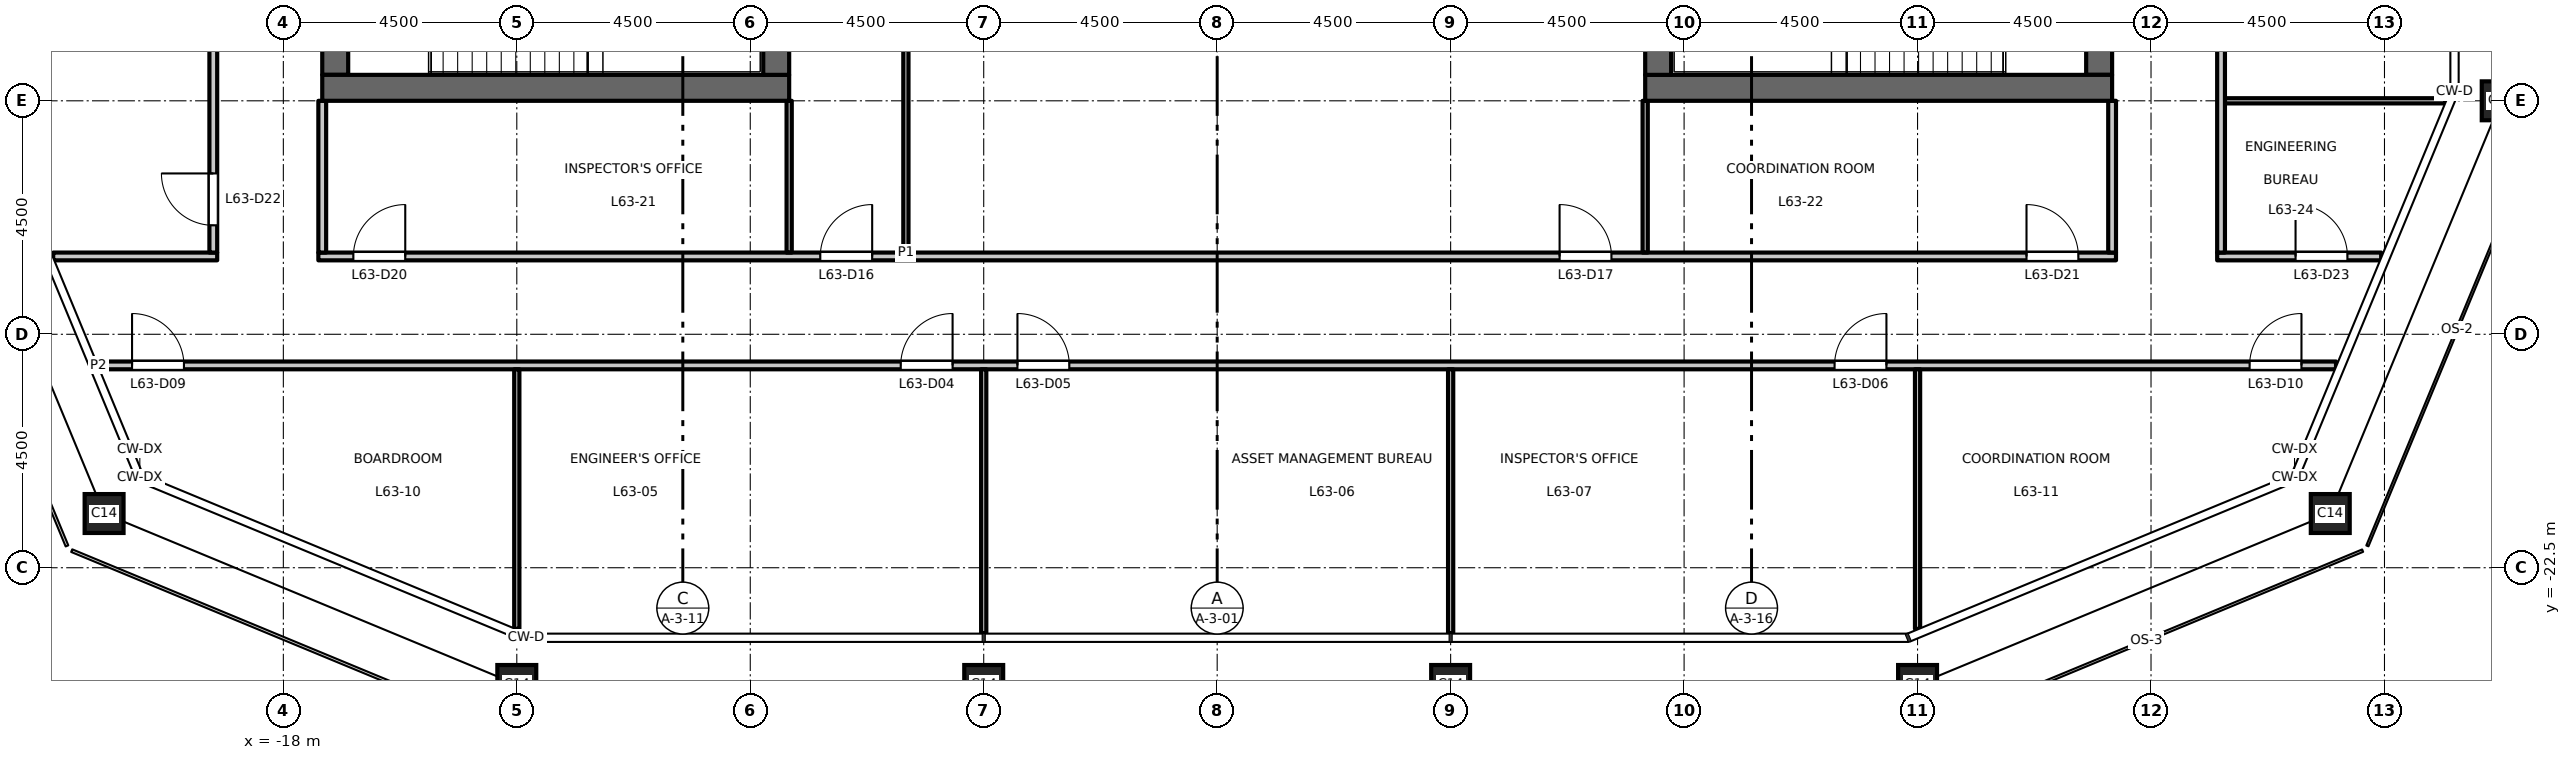
"""IFC4 building model, lengths in metres.
Left out: names, types, materials, properties, quantities, classifications, styles, units other than length and angle.
Written with IfcOpenShell. Run it as: python <this file> out.ifc"""

import sys

from ifc_helpers import new_model, si_unit, direction, frame, frame_2d, origin, origin_2d, place, context, subcontext, project, spatial, rectangle, hollow_rectangle, extrude, element, fill, save


model = new_model("IFC4")
c1 = context("Model", 3, precision=1e-05, world=origin(), true_north=direction((0.0, 1.0)))
c2 = subcontext(c1, "Body", "Model", "MODEL_VIEW")
j1 = project(units=[si_unit("LENGTHUNIT", "METRE"), si_unit("PLANEANGLEUNIT", "RADIAN")], contexts=[c1])
p1 = place(None, origin())
s1 = spatial("IfcSite", under=j1, at=p1, CompositionType="ELEMENT")
p2 = place(p1, origin())
s2 = spatial("IfcBuilding", under=s1, at=p2, CompositionType="ELEMENT")
p3 = place(p2, frame((0.0, 0.0, 294.2)))
s3 = spatial("IfcBuildingStorey", under=s2, at=p3, CompositionType="ELEMENT", Elevation=294.2)
for number, where, z_axis, x_axis in (
    (1, (-13.5, -24.75, 0.0), (0.0, 0.0, 1.0), (1.0, 0.0, 0.0)),
    (2, (-4.5, -24.75, 0.0), (0.0, 0.0, 1.0), (1.0, 0.0, 0.0)),
    (3, (4.5, -24.75, 0.0), (0.0, 0.0, 1.0), (1.0, 0.0, 0.0)),
    (4, (13.5, -24.75, 0.0), (0.0, 0.0, 1.0), (1.0, 0.0, 0.0)),
    (5, (21.455, -21.455, 0.0), (0.0, 0.0, 1.0), (1.0, 0.0, 0.0)),
    (6, (24.75, -13.5, 0.0), (0.0, 0.0, 1.0), (1.0, 0.0, 0.0)),
    (7, (-21.455, -21.455, 0.0), (0.0, 0.0, 1.0), (1.0, 0.0, 0.0)),
):
    element("IfcColumn", number, at=place(p3, frame(where, z_axis=z_axis, x_axis=x_axis)), inside=s3, PredefinedType="COLUMN", context=c2, shape_type="SweptSolid", body=[
        extrude(hollow_rectangle(XDim=0.75, YDim=0.75, WallThickness=0.04, at=origin_2d()), origin(), (0.0, 0.0, 1.0), 4.5),
    ])
p4 = place(p3, frame((-17.0, -13.0, 0.0), z_axis=(0.0, 0.0, 1.0), x_axis=(0.0, 1.0, 0.0)))
e8 = element("IfcWall", 8, at=p4, inside=s3, PredefinedType="SHEAR", context=c2, shape_type="SweptSolid", body=[
    extrude(rectangle(XDim=26.0, YDim=0.5, at=frame_2d((13.0, 0.0))), origin(), (0.0, 0.0, 1.0), 4.35),
])
p5 = place(p4, frame((16.825, 0.0, 0.0)))
e9 = element("IfcOpeningElement", 9, at=p5, cuts=e8, PredefinedType="OPENING", context=c2, shape_type="SweptSolid", body=[
    extrude(rectangle(XDim=1.8, YDim=2.1, at=frame_2d((0.9, 1.05))), frame((0.0, 0.26, 0.0), z_axis=(0.0, -1.0, 0.0), x_axis=(1.0, 0.0, 0.0)), (0.0, 0.0, 1.0), 0.52),
])
p6 = place(p4, frame((7.375, 0.0, 0.0)))
e10 = element("IfcOpeningElement", 10, at=p6, cuts=e8, PredefinedType="OPENING", context=c2, shape_type="SweptSolid", body=[
    extrude(rectangle(XDim=1.8, YDim=2.1, at=frame_2d((0.9, 1.05))), frame((0.0, 0.26, 0.0), z_axis=(0.0, -1.0, 0.0), x_axis=(1.0, 0.0, 0.0)), (0.0, 0.0, 1.0), 0.52),
])
p7 = place(p3, frame((-8.25, -13.25, 0.0), z_axis=(0.0, 0.0, 1.0), x_axis=(-1.0, 0.0, 0.0)))
e11 = element("IfcWall", 11, at=p7, inside=s3, PredefinedType="SHEAR", context=c2, shape_type="SweptSolid", body=[
    extrude(rectangle(XDim=9.0, YDim=0.5, at=frame_2d((4.5, 0.0))), origin(), (0.0, 0.0, 1.0), 4.35),
])
p8 = place(p3, frame((-8.5, -13.0, 0.0), z_axis=(0.0, 0.0, 1.0), x_axis=(0.0, 1.0, 0.0)))
e12 = element("IfcWall", 12, at=p8, inside=s3, PredefinedType="SHEAR", context=c2, shape_type="SweptSolid", body=[
    extrude(rectangle(XDim=26.0, YDim=0.5, at=frame_2d((13.0, 0.0))), origin(), (0.0, 0.0, 1.0), 4.35),
])
p9 = place(p3, frame((17.0, -13.0, 0.0), z_axis=(0.0, 0.0, 1.0), x_axis=(0.0, 1.0, 0.0)))
e13 = element("IfcWall", 13, at=p9, inside=s3, PredefinedType="SHEAR", context=c2, shape_type="SweptSolid", body=[
    extrude(rectangle(XDim=26.0, YDim=0.5, at=frame_2d((13.0, 0.0))), origin(), (0.0, 0.0, 1.0), 4.35),
])
p10 = place(p9, frame((16.825, 0.0, 0.0)))
e14 = element("IfcOpeningElement", 14, at=p10, cuts=e13, PredefinedType="OPENING", context=c2, shape_type="SweptSolid", body=[
    extrude(rectangle(XDim=1.8, YDim=2.1, at=frame_2d((0.9, 1.05))), frame((0.0, 0.26, 0.0), z_axis=(0.0, -1.0, 0.0), x_axis=(1.0, 0.0, 0.0)), (0.0, 0.0, 1.0), 0.52),
])
p11 = place(p9, frame((7.375, 0.0, 0.0)))
e15 = element("IfcOpeningElement", 15, at=p11, cuts=e13, PredefinedType="OPENING", context=c2, shape_type="SweptSolid", body=[
    extrude(rectangle(XDim=1.8, YDim=2.1, at=frame_2d((0.9, 1.05))), frame((0.0, 0.26, 0.0), z_axis=(0.0, -1.0, 0.0), x_axis=(1.0, 0.0, 0.0)), (0.0, 0.0, 1.0), 0.52),
])
p12 = place(p3, frame((8.25, -13.25, 0.0), z_axis=(0.0, 0.0, 1.0), x_axis=(1.0, 0.0, 0.0)))
e16 = element("IfcWall", 16, at=p12, inside=s3, PredefinedType="SHEAR", context=c2, shape_type="SweptSolid", body=[
    extrude(rectangle(XDim=9.0, YDim=0.5, at=frame_2d((4.5, 0.0))), origin(), (0.0, 0.0, 1.0), 4.35),
])
p13 = place(p3, frame((8.5, -13.0, 0.0), z_axis=(0.0, 0.0, 1.0), x_axis=(0.0, 1.0, 0.0)))
e17 = element("IfcWall", 17, at=p13, inside=s3, PredefinedType="SHEAR", context=c2, shape_type="SweptSolid", body=[
    extrude(rectangle(XDim=26.0, YDim=0.5, at=frame_2d((13.0, 0.0))), origin(), (0.0, 0.0, 1.0), 4.35),
])
p14 = place(p3, frame((-21.566, -18.6, 0.0), z_axis=(0.0, 0.0, 1.0), x_axis=(1.0, 0.0, 0.0)))
e18 = element("IfcWall", 18, at=p14, inside=s3, PredefinedType="PARTITIONING", context=c2, shape_type="SweptSolid", body=[
    extrude(rectangle(XDim=43.132, YDim=0.15, at=frame_2d((21.566, 0.0))), origin(), (0.0, 0.0, 1.0), 4.35),
])
p15 = place(p14, frame((15.466, 0.0, 0.0)))
e19 = element("IfcOpeningElement", 19, at=p15, cuts=e18, PredefinedType="OPENING", context=c2, shape_type="SweptSolid", body=[
    extrude(rectangle(XDim=1.0, YDim=2.1, at=frame_2d((0.5, 1.05))), frame((0.0, 0.085, 0.0), z_axis=(0.0, -1.0, 0.0), x_axis=(1.0, 0.0, 0.0)), (0.0, 0.0, 1.0), 0.17),
])
p16 = place(p14, frame((17.716, 0.0, 0.0)))
e20 = element("IfcOpeningElement", 20, at=p16, cuts=e18, PredefinedType="OPENING", context=c2, shape_type="SweptSolid", body=[
    extrude(rectangle(XDim=1.0, YDim=2.1, at=frame_2d((0.5, 1.05))), frame((0.0, 0.085, 0.0), z_axis=(0.0, -1.0, 0.0), x_axis=(1.0, 0.0, 0.0)), (0.0, 0.0, 1.0), 0.17),
])
p17 = place(p14, frame((33.466, 0.0, 0.0)))
e21 = element("IfcOpeningElement", 21, at=p17, cuts=e18, PredefinedType="OPENING", context=c2, shape_type="SweptSolid", body=[
    extrude(rectangle(XDim=1.0, YDim=2.1, at=frame_2d((0.5, 1.05))), frame((0.0, 0.085, 0.0), z_axis=(0.0, -1.0, 0.0), x_axis=(1.0, 0.0, 0.0)), (0.0, 0.0, 1.0), 0.17),
])
p18 = place(p14, frame((0.65, 0.0, 0.0)))
e22 = element("IfcOpeningElement", 22, at=p18, cuts=e18, PredefinedType="OPENING", context=c2, shape_type="SweptSolid", body=[
    extrude(rectangle(XDim=1.0, YDim=2.1, at=frame_2d((0.5, 1.05))), frame((0.0, 0.085, 0.0), z_axis=(0.0, -1.0, 0.0), x_axis=(1.0, 0.0, 0.0)), (0.0, 0.0, 1.0), 0.17),
])
p19 = place(p14, frame((41.466, 0.0, 0.0)))
e23 = element("IfcOpeningElement", 23, at=p19, cuts=e18, PredefinedType="OPENING", context=c2, shape_type="SweptSolid", body=[
    extrude(rectangle(XDim=1.0, YDim=2.1, at=frame_2d((0.5, 1.05))), frame((0.0, 0.085, 0.0), z_axis=(0.0, -1.0, 0.0), x_axis=(1.0, 0.0, 0.0)), (0.0, 0.0, 1.0), 0.17),
])
p20 = place(p3, frame((-22.436, -16.5, 0.0), z_axis=(0.0, 0.0, 1.0), x_axis=(1.0, 0.0, 0.0)))
e24 = element("IfcWall", 24, at=p20, inside=s3, PredefinedType="PARTITIONING", context=c2, shape_type="SweptSolid", body=[
    extrude(rectangle(XDim=3.161, YDim=0.15, at=frame_2d((1.581, 0.0))), origin(), (0.0, 0.0, 1.0), 4.35),
])
p21 = place(p3, frame((-17.325, -16.5, 0.0), z_axis=(0.0, 0.0, 1.0), x_axis=(1.0, 0.0, 0.0)))
e25 = element("IfcWall", 25, at=p21, inside=s3, PredefinedType="PARTITIONING", context=c2, shape_type="SweptSolid", body=[
    extrude(rectangle(XDim=34.65, YDim=0.15, at=frame_2d((17.325, 0.0))), origin(), (0.0, 0.0, 1.0), 4.35),
])
p22 = place(p21, frame((9.675, 0.0, 0.0)))
e26 = element("IfcOpeningElement", 26, at=p22, cuts=e25, PredefinedType="OPENING", context=c2, shape_type="SweptSolid", body=[
    extrude(rectangle(XDim=1.0, YDim=2.1, at=frame_2d((0.5, 1.05))), frame((0.0, 0.085, 0.0), z_axis=(0.0, -1.0, 0.0), x_axis=(1.0, 0.0, 0.0)), (0.0, 0.0, 1.0), 0.17),
])
p23 = place(p21, frame((23.925, 0.0, 0.0)))
e27 = element("IfcOpeningElement", 27, at=p23, cuts=e25, PredefinedType="OPENING", context=c2, shape_type="SweptSolid", body=[
    extrude(rectangle(XDim=1.0, YDim=2.1, at=frame_2d((0.5, 1.05))), frame((0.0, 0.085, 0.0), z_axis=(0.0, -1.0, 0.0), x_axis=(1.0, 0.0, 0.0)), (0.0, 0.0, 1.0), 0.17),
])
p24 = place(p21, frame((0.675, 0.0, 0.0)))
e28 = element("IfcOpeningElement", 28, at=p24, cuts=e25, PredefinedType="OPENING", context=c2, shape_type="SweptSolid", body=[
    extrude(rectangle(XDim=1.0, YDim=2.1, at=frame_2d((0.5, 1.05))), frame((0.0, 0.085, 0.0), z_axis=(0.0, -1.0, 0.0), x_axis=(1.0, 0.0, 0.0)), (0.0, 0.0, 1.0), 0.17),
])
p25 = place(p21, frame((32.925, 0.0, 0.0)))
e29 = element("IfcOpeningElement", 29, at=p25, cuts=e25, PredefinedType="OPENING", context=c2, shape_type="SweptSolid", body=[
    extrude(rectangle(XDim=1.0, YDim=2.1, at=frame_2d((0.5, 1.05))), frame((0.0, 0.085, 0.0), z_axis=(0.0, -1.0, 0.0), x_axis=(1.0, 0.0, 0.0)), (0.0, 0.0, 1.0), 0.17),
])
p26 = place(p3, frame((19.275, -16.5, 0.0), z_axis=(0.0, 0.0, 1.0), x_axis=(1.0, 0.0, 0.0)))
e30 = element("IfcWall", 30, at=p26, inside=s3, PredefinedType="PARTITIONING", context=c2, shape_type="SweptSolid", body=[
    extrude(rectangle(XDim=3.161, YDim=0.15, at=frame_2d((1.581, 0.0))), origin(), (0.0, 0.0, 1.0), 4.35),
])
p27 = place(p26, frame((1.511, 0.0, 0.0)))
e31 = element("IfcOpeningElement", 31, at=p27, cuts=e30, PredefinedType="OPENING", context=c2, shape_type="SweptSolid", body=[
    extrude(rectangle(XDim=1.0, YDim=2.1, at=frame_2d((0.5, 1.05))), frame((0.0, 0.085, 0.0), z_axis=(0.0, -1.0, 0.0), x_axis=(1.0, 0.0, 0.0)), (0.0, 0.0, 1.0), 0.17),
])
p28 = place(p3, frame((19.425, -13.5, 0.0), z_axis=(0.0, 0.0, 1.0), x_axis=(1.0, 0.0, 0.0)))
e32 = element("IfcWall", 32, at=p28, inside=s3, PredefinedType="PARTITIONING", context=c2, shape_type="SweptSolid", body=[
    extrude(rectangle(XDim=4.253, YDim=0.1, at=frame_2d((2.126, 0.0))), origin(), (0.0, 0.0, 1.0), 4.35),
])
p29 = place(p3, frame((-19.35, -16.425, 0.0), z_axis=(0.0, 0.0, 1.0), x_axis=(0.0, 1.0, 0.0)))
e33 = element("IfcWall", 33, at=p29, inside=s3, PredefinedType="PARTITIONING", context=c2, shape_type="SweptSolid", body=[
    extrude(rectangle(XDim=32.85, YDim=0.15, at=frame_2d((16.425, 0.0))), origin(), (0.0, 0.0, 1.0), 4.35),
])
p30 = place(p29, frame((0.525, 0.0, 0.0)))
e34 = element("IfcOpeningElement", 34, at=p30, cuts=e33, PredefinedType="OPENING", context=c2, shape_type="SweptSolid", body=[
    extrude(rectangle(XDim=1.0, YDim=2.1, at=frame_2d((0.5, 1.05))), frame((0.0, 0.085, 0.0), z_axis=(0.0, -1.0, 0.0), x_axis=(1.0, 0.0, 0.0)), (0.0, 0.0, 1.0), 0.17),
])
p31 = place(p3, frame((-17.25, -16.425, 0.0), z_axis=(0.0, 0.0, 1.0), x_axis=(0.0, 1.0, 0.0)))
e35 = element("IfcWall", 35, at=p31, inside=s3, PredefinedType="PARTITIONING", context=c2, shape_type="SweptSolid", body=[
    extrude(rectangle(XDim=2.925, YDim=0.15, at=frame_2d((1.462, 0.0))), origin(), (0.0, 0.0, 1.0), 4.35),
])
p32 = place(p3, frame((-13.5, -23.678, 0.0), z_axis=(0.0, 0.0, 1.0), x_axis=(0.0, 1.0, 0.0)))
e36 = element("IfcWall", 36, at=p32, inside=s3, PredefinedType="PARTITIONING", context=c2, shape_type="SweptSolid", body=[
    extrude(rectangle(XDim=5.003, YDim=0.1, at=frame_2d((2.501, 0.0))), origin(), (0.0, 0.0, 1.0), 3.75),
])
p33 = place(p3, frame((-8.25, -16.425, 0.0), z_axis=(0.0, 0.0, 1.0), x_axis=(0.0, 1.0, 0.0)))
e37 = element("IfcWall", 37, at=p33, inside=s3, PredefinedType="PARTITIONING", context=c2, shape_type="SweptSolid", body=[
    extrude(rectangle(XDim=2.925, YDim=0.1, at=frame_2d((1.462, 0.0))), origin(), (0.0, 0.0, 1.0), 4.35),
])
p34 = place(p3, frame((-6.0, -16.425, 0.0), z_axis=(0.0, 0.0, 1.0), x_axis=(0.0, 1.0, 0.0)))
e38 = element("IfcWall", 38, at=p34, inside=s3, PredefinedType="PARTITIONING", context=c2, shape_type="SweptSolid", body=[
    extrude(rectangle(XDim=7.875, YDim=0.1, at=frame_2d((3.938, 0.0))), origin(), (0.0, 0.0, 1.0), 4.35),
])
for number, where, z_axis, x_axis in (
    (39, (-4.5, -23.76, 0.0), (0.0, 0.0, 1.0), (0.0, 1.0, 0.0)),
    (40, (4.5, -23.76, 0.0), (0.0, 0.0, 1.0), (0.0, 1.0, 0.0)),
):
    element("IfcWall", number, at=place(p3, frame(where, z_axis=z_axis, x_axis=x_axis)), inside=s3, PredefinedType="PARTITIONING", context=c2, shape_type="SweptSolid", body=[
        extrude(rectangle(XDim=5.085, YDim=0.1, at=frame_2d((2.542, 0.0))), origin(), (0.0, 0.0, 1.0), 3.65),
    ])
p35 = place(p3, frame((8.25, -16.425, 0.0), z_axis=(0.0, 0.0, 1.0), x_axis=(0.0, 1.0, 0.0)))
e41 = element("IfcWall", 41, at=p35, inside=s3, PredefinedType="PARTITIONING", context=c2, shape_type="SweptSolid", body=[
    extrude(rectangle(XDim=2.925, YDim=0.1, at=frame_2d((1.462, 0.0))), origin(), (0.0, 0.0, 1.0), 4.35),
])
p36 = place(p3, frame((13.5, -23.678, 0.0), z_axis=(0.0, 0.0, 1.0), x_axis=(0.0, 1.0, 0.0)))
e42 = element("IfcWall", 42, at=p36, inside=s3, PredefinedType="PARTITIONING", context=c2, shape_type="SweptSolid", body=[
    extrude(rectangle(XDim=5.003, YDim=0.1, at=frame_2d((2.501, 0.0))), origin(), (0.0, 0.0, 1.0), 3.75),
])
p37 = place(p3, frame((17.25, -16.425, 0.0), z_axis=(0.0, 0.0, 1.0), x_axis=(0.0, 1.0, 0.0)))
e43 = element("IfcWall", 43, at=p37, inside=s3, PredefinedType="PARTITIONING", context=c2, shape_type="SweptSolid", body=[
    extrude(rectangle(XDim=2.925, YDim=0.15, at=frame_2d((1.462, 0.0))), origin(), (0.0, 0.0, 1.0), 4.35),
])
p38 = place(p3, frame((19.35, -16.425, 0.0), z_axis=(0.0, 0.0, 1.0), x_axis=(0.0, 1.0, 0.0)))
e44 = element("IfcWall", 44, at=p38, inside=s3, PredefinedType="PARTITIONING", context=c2, shape_type="SweptSolid", body=[
    extrude(rectangle(XDim=32.85, YDim=0.15, at=frame_2d((16.425, 0.0))), origin(), (0.0, 0.0, 1.0), 4.35),
])
p39 = place(p38, frame((10.325, 0.0, 0.0)))
e45 = element("IfcOpeningElement", 45, at=p39, cuts=e44, PredefinedType="OPENING", context=c2, shape_type="SweptSolid", body=[
    extrude(rectangle(XDim=1.0, YDim=2.1, at=frame_2d((0.5, 1.05))), frame((0.0, 0.085, 0.0), z_axis=(0.0, -1.0, 0.0), x_axis=(1.0, 0.0, 0.0)), (0.0, 0.0, 1.0), 0.17),
])
p40 = place(p38, frame((12.575, 0.0, 0.0)))
e46 = element("IfcOpeningElement", 46, at=p40, cuts=e44, PredefinedType="OPENING", context=c2, shape_type="SweptSolid", body=[
    extrude(rectangle(XDim=1.0, YDim=2.1, at=frame_2d((0.5, 1.05))), frame((0.0, 0.085, 0.0), z_axis=(0.0, -1.0, 0.0), x_axis=(1.0, 0.0, 0.0)), (0.0, 0.0, 1.0), 0.17),
])
p41 = place(p38, frame((28.325, 0.0, 0.0)))
e47 = element("IfcOpeningElement", 47, at=p41, cuts=e44, PredefinedType="OPENING", context=c2, shape_type="SweptSolid", body=[
    extrude(rectangle(XDim=1.0, YDim=2.1, at=frame_2d((0.5, 1.05))), frame((0.0, 0.085, 0.0), z_axis=(0.0, -1.0, 0.0), x_axis=(1.0, 0.0, 0.0)), (0.0, 0.0, 1.0), 0.17),
])
p42 = place(p15, origin())
e48 = element("IfcDoor", 48, at=p42, inside=s3, OperationType="SINGLE_SWING_RIGHT", PredefinedType="DOOR", context=c2, shape_type="SweptSolid", body=[
    extrude(rectangle(XDim=1.0, YDim=2.1, at=frame_2d((0.5, 1.05))), frame((0.0, 0.025, 0.0), z_axis=(0.0, -1.0, 0.0), x_axis=(1.0, 0.0, 0.0)), (0.0, 0.0, 1.0), 0.05),
])
fill(e19, e48)
p43 = place(p16, origin())
e49 = element("IfcDoor", 49, at=p43, inside=s3, OperationType="SINGLE_SWING_LEFT", PredefinedType="DOOR", context=c2, shape_type="SweptSolid", body=[
    extrude(rectangle(XDim=1.0, YDim=2.1, at=frame_2d((0.5, 1.05))), frame((0.0, 0.025, 0.0), z_axis=(0.0, -1.0, 0.0), x_axis=(1.0, 0.0, 0.0)), (0.0, 0.0, 1.0), 0.05),
])
fill(e20, e49)
p44 = place(p17, origin())
e50 = element("IfcDoor", 50, at=p44, inside=s3, OperationType="SINGLE_SWING_RIGHT", PredefinedType="DOOR", context=c2, shape_type="SweptSolid", body=[
    extrude(rectangle(XDim=1.0, YDim=2.1, at=frame_2d((0.5, 1.05))), frame((0.0, 0.025, 0.0), z_axis=(0.0, -1.0, 0.0), x_axis=(1.0, 0.0, 0.0)), (0.0, 0.0, 1.0), 0.05),
])
fill(e21, e50)
p45 = place(p18, origin())
e51 = element("IfcDoor", 51, at=p45, inside=s3, OperationType="SINGLE_SWING_LEFT", PredefinedType="DOOR", context=c2, shape_type="SweptSolid", body=[
    extrude(rectangle(XDim=1.0, YDim=2.1, at=frame_2d((0.5, 1.05))), frame((0.0, 0.025, 0.0), z_axis=(0.0, -1.0, 0.0), x_axis=(1.0, 0.0, 0.0)), (0.0, 0.0, 1.0), 0.05),
])
fill(e22, e51)
p46 = place(p19, origin())
e52 = element("IfcDoor", 52, at=p46, inside=s3, OperationType="SINGLE_SWING_RIGHT", PredefinedType="DOOR", context=c2, shape_type="SweptSolid", body=[
    extrude(rectangle(XDim=1.0, YDim=2.1, at=frame_2d((0.5, 1.05))), frame((0.0, 0.025, 0.0), z_axis=(0.0, -1.0, 0.0), x_axis=(1.0, 0.0, 0.0)), (0.0, 0.0, 1.0), 0.05),
])
fill(e23, e52)
p47 = place(p22, origin())
e53 = element("IfcDoor", 53, at=p47, inside=s3, OperationType="SINGLE_SWING_RIGHT", PredefinedType="DOOR", context=c2, shape_type="SweptSolid", body=[
    extrude(rectangle(XDim=1.0, YDim=2.1, at=frame_2d((0.5, 1.05))), frame((0.0, 0.025, 0.0), z_axis=(0.0, -1.0, 0.0), x_axis=(1.0, 0.0, 0.0)), (0.0, 0.0, 1.0), 0.05),
])
fill(e26, e53)
p48 = place(p23, origin())
e54 = element("IfcDoor", 54, at=p48, inside=s3, OperationType="SINGLE_SWING_LEFT", PredefinedType="DOOR", context=c2, shape_type="SweptSolid", body=[
    extrude(rectangle(XDim=1.0, YDim=2.1, at=frame_2d((0.5, 1.05))), frame((0.0, 0.025, 0.0), z_axis=(0.0, -1.0, 0.0), x_axis=(1.0, 0.0, 0.0)), (0.0, 0.0, 1.0), 0.05),
])
fill(e27, e54)
p49 = place(p24, origin())
e55 = element("IfcDoor", 55, at=p49, inside=s3, OperationType="SINGLE_SWING_RIGHT", PredefinedType="DOOR", context=c2, shape_type="SweptSolid", body=[
    extrude(rectangle(XDim=1.0, YDim=2.1, at=frame_2d((0.5, 1.05))), frame((0.0, 0.025, 0.0), z_axis=(0.0, -1.0, 0.0), x_axis=(1.0, 0.0, 0.0)), (0.0, 0.0, 1.0), 0.05),
])
fill(e28, e55)
p50 = place(p25, origin())
e56 = element("IfcDoor", 56, at=p50, inside=s3, OperationType="SINGLE_SWING_LEFT", PredefinedType="DOOR", context=c2, shape_type="SweptSolid", body=[
    extrude(rectangle(XDim=1.0, YDim=2.1, at=frame_2d((0.5, 1.05))), frame((0.0, 0.025, 0.0), z_axis=(0.0, -1.0, 0.0), x_axis=(1.0, 0.0, 0.0)), (0.0, 0.0, 1.0), 0.05),
])
fill(e29, e56)
p51 = place(p30, origin())
e57 = element("IfcDoor", 57, at=p51, inside=s3, OperationType="SINGLE_SWING_RIGHT", PredefinedType="DOOR", context=c2, shape_type="SweptSolid", body=[
    extrude(rectangle(XDim=1.0, YDim=2.1, at=frame_2d((0.5, 1.05))), frame((0.0, 0.025, 0.0), z_axis=(0.0, -1.0, 0.0), x_axis=(1.0, 0.0, 0.0)), (0.0, 0.0, 1.0), 0.05),
])
fill(e34, e57)
p52 = place(p27, origin())
e58 = element("IfcDoor", 58, at=p52, inside=s3, OperationType="SINGLE_SWING_LEFT", PredefinedType="DOOR", context=c2, shape_type="SweptSolid", body=[
    extrude(rectangle(XDim=1.0, YDim=2.1, at=frame_2d((0.5, 1.05))), frame((0.0, 0.025, 0.0), z_axis=(0.0, -1.0, 0.0), x_axis=(1.0, 0.0, 0.0)), (0.0, 0.0, 1.0), 0.05),
])
fill(e31, e58)
save(model, sys.argv[1])
